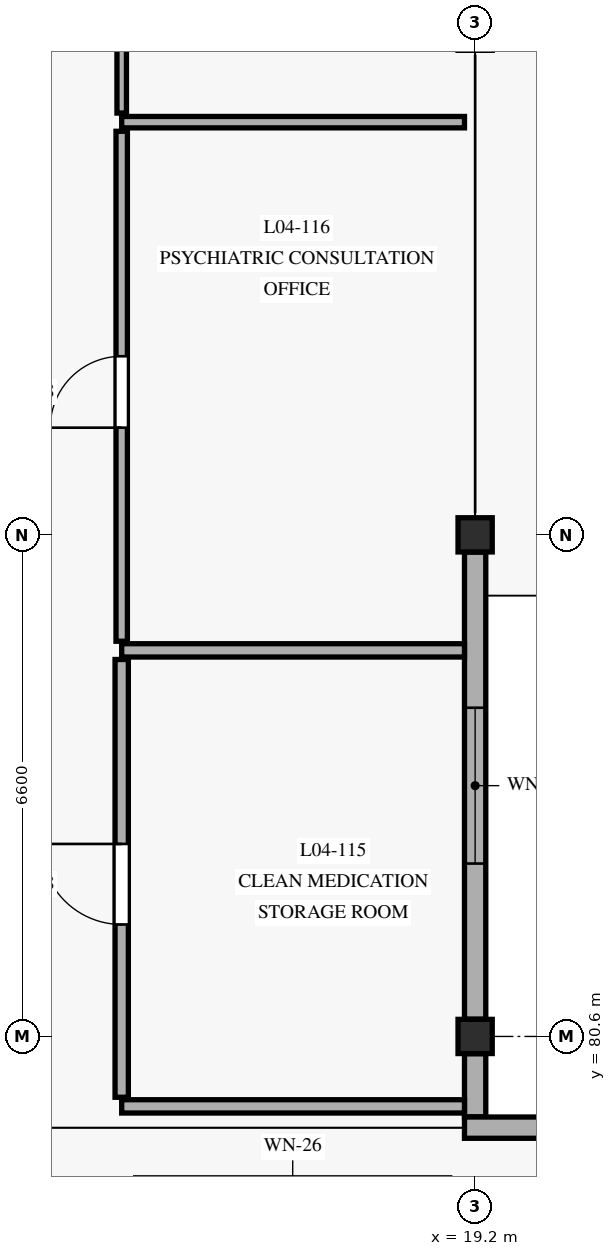
"""IFC4 building model, lengths in metres.
Left out: names, types, materials, properties, quantities, classifications, styles, units other than length and angle.
Written with IfcOpenShell. Run it as: python <this file> out.ifc"""

import sys

from ifc_helpers import new_model, si_unit, direction, frame, frame_2d, origin, origin_with_axes, origin_2d, place, context, subcontext, project, spatial, rectangle, extrude, element, fill, save


model = new_model("IFC4")
c1 = context("Model", 3, precision=1e-05, world=origin(), true_north=direction((0.0, 1.0)))
c2 = subcontext(c1, "Body", "Model", "MODEL_VIEW")
j1 = project(units=[si_unit("LENGTHUNIT", "METRE"), si_unit("PLANEANGLEUNIT", "RADIAN")], contexts=[c1])
p1 = place(None, origin())
s1 = spatial("IfcSite", under=j1, at=p1, CompositionType="ELEMENT")
p2 = place(p1, origin())
s2 = spatial("IfcBuilding", under=s1, at=p2, CompositionType="ELEMENT")
p3 = place(p2, frame((0.0, 0.0, 13.5)))
s3 = spatial("IfcBuildingStorey", under=s2, at=p3, CompositionType="ELEMENT", Elevation=13.5)
for number, where, z_axis, x_axis in (
    (1, (19.2, 80.6, 0.0), (0.0, 0.0, 1.0), (1.0, 0.0, 0.0)),
    (2, (19.2, 87.2, 0.0), (0.0, 0.0, 1.0), (1.0, 0.0, 0.0)),
):
    element("IfcColumn", number, at=place(p3, frame(where, z_axis=z_axis, x_axis=x_axis)), inside=s3, PredefinedType="COLUMN", context=c2, shape_type="SweptSolid", body=[
        extrude(rectangle(XDim=0.45, YDim=0.45, at=origin_2d()), origin(), (0.0, 0.0, 1.0), 4.05),
    ])
p4 = place(p3, frame((19.2, 79.542, 0.0), z_axis=(0.0, 0.0, 1.0), x_axis=(0.0, 1.0, 0.0)))
e3 = element("IfcWall", 3, at=p4, inside=s3, PredefinedType="SOLIDWALL", context=c2, shape_type="SweptSolid", body=[
    extrude(rectangle(XDim=0.831, YDim=0.28, at=frame_2d((0.416, 0.0))), origin(), (0.0, 0.0, 1.0), 3.42),
])
p5 = place(p3, frame((19.2, 80.827, 0.0), z_axis=(0.0, 0.0, 1.0), x_axis=(0.0, 1.0, 0.0)))
e4 = element("IfcWall", 4, at=p5, inside=s3, PredefinedType="SOLIDWALL", context=c2, shape_type="SweptSolid", body=[
    extrude(rectangle(XDim=6.146, YDim=0.28, at=frame_2d((3.073, 0.0))), origin(), (0.0, 0.0, 1.0), 3.42),
])
p6 = place(p5, frame((2.048, 0.0, 0.8)))
e5 = element("IfcOpeningElement", 5, at=p6, cuts=e4, PredefinedType="OPENING", context=c2, shape_type="SweptSolid", body=[
    extrude(rectangle(XDim=2.05, YDim=1.95, at=frame_2d((1.025, 0.975))), frame((0.0, 0.15, 0.0), z_axis=(0.0, -1.0, 0.0), x_axis=(1.0, 0.0, 0.0)), (0.0, 0.0, 1.0), 0.3),
])
p7 = place(p3, frame((22.34, 79.4, 0.0), z_axis=(0.0, 0.0, 1.0), x_axis=(-1.0, 0.0, 0.0)))
e6 = element("IfcWall", 6, at=p7, inside=s3, PredefinedType="SOLIDWALL", context=c2, shape_type="SweptSolid", body=[
    extrude(rectangle(XDim=3.28, YDim=0.28, at=frame_2d((1.64, 0.0))), origin(), (0.0, 0.0, 1.0), 3.75),
])
p8 = place(p7, frame((1.115, 0.0, 0.88)))
e7 = element("IfcOpeningElement", 7, at=p8, cuts=e6, PredefinedType="OPENING", context=c2, shape_type="SweptSolid", body=[
    extrude(rectangle(XDim=1.05, YDim=2.2, at=frame_2d((0.525, 1.1))), frame((0.0, 0.15, 0.0), z_axis=(0.0, -1.0, 0.0), x_axis=(1.0, 0.0, 0.0)), (0.0, 0.0, 1.0), 0.3),
])
p9 = place(p3, frame((14.55, 79.8, 0.0), z_axis=(0.0, 0.0, 1.0), x_axis=(0.0, 1.0, 0.0)))
e8 = element("IfcWall", 8, at=p9, inside=s3, PredefinedType="PARTITIONING", context=c2, shape_type="SweptSolid", body=[
    extrude(rectangle(XDim=5.76, YDim=0.175, at=frame_2d((2.88, 0.0))), origin(), (0.0, 0.0, 1.0), 3.345),
])
p10 = place(p9, frame((2.273, 0.0, 0.0)))
e9 = element("IfcOpeningElement", 9, at=p10, cuts=e8, PredefinedType="OPENING", context=c2, shape_type="SweptSolid", body=[
    extrude(rectangle(XDim=1.06, YDim=2.2, at=frame_2d((0.53, 1.1))), frame((0.0, 0.098, 0.0), z_axis=(0.0, -1.0, 0.0), x_axis=(1.0, 0.0, 0.0)), (0.0, 0.0, 1.0), 0.195),
])
for number, where, z_axis, x_axis in (
    (10, (14.55, 79.68, 0.0), (0.0, 0.0, 1.0), (1.0, 0.0, 0.0)),
    (11, (14.55, 85.68, 0.0), (0.0, 0.0, 1.0), (1.0, 0.0, 0.0)),
):
    element("IfcWall", number, at=place(p3, frame(where, z_axis=z_axis, x_axis=x_axis)), inside=s3, PredefinedType="PARTITIONING", context=c2, shape_type="SweptSolid", body=[
        extrude(rectangle(XDim=4.51, YDim=0.175, at=frame_2d((2.255, 0.0))), origin(), (0.0, 0.0, 1.0), 3.415),
    ])
p11 = place(p3, frame((14.55, 85.8, 0.0), z_axis=(0.0, 0.0, 1.0), x_axis=(0.0, 1.0, 0.0)))
e12 = element("IfcWall", 12, at=p11, inside=s3, PredefinedType="PARTITIONING", context=c2, shape_type="SweptSolid", body=[
    extrude(rectangle(XDim=6.71, YDim=0.15, at=frame_2d((3.355, 0.0))), origin(), (0.0, 0.0, 1.0), 3.345),
])
p12 = place(p11, frame((2.81, 0.0, 0.0)))
e13 = element("IfcOpeningElement", 13, at=p12, cuts=e12, PredefinedType="OPENING", context=c2, shape_type="SweptSolid", body=[
    extrude(rectangle(XDim=0.94, YDim=2.18, at=frame_2d((0.47, 1.09))), frame((0.0, 0.085, 0.0), z_axis=(0.0, -1.0, 0.0), x_axis=(1.0, 0.0, 0.0)), (0.0, 0.0, 1.0), 0.17),
])
p13 = place(p3, frame((14.55, 92.63, 0.0), z_axis=(0.0, 0.0, 1.0), x_axis=(1.0, 0.0, 0.0)))
e14 = element("IfcWall", 14, at=p13, inside=s3, PredefinedType="PARTITIONING", context=c2, shape_type="SweptSolid", body=[
    extrude(rectangle(XDim=4.51, YDim=0.15, at=frame_2d((2.255, 0.0))), origin(), (0.0, 0.0, 1.0), 3.415),
])
p14 = place(p3, frame((14.55, 92.75, 0.0), z_axis=(0.0, 0.0, 1.0), x_axis=(0.0, 1.0, 0.0)))
e15 = element("IfcWall", 15, at=p14, inside=s3, PredefinedType="PARTITIONING", context=c2, shape_type="SweptSolid", body=[
    extrude(rectangle(XDim=5.36, YDim=0.125, at=frame_2d((2.68, 0.0))), origin(), (0.0, 0.0, 1.0), 3.345),
])
p15 = place(p14, frame((2.23, 0.0, 0.0)))
e16 = element("IfcOpeningElement", 16, at=p15, cuts=e15, PredefinedType="OPENING", context=c2, shape_type="SweptSolid", body=[
    extrude(rectangle(XDim=0.9, YDim=2.12, at=frame_2d((0.45, 1.06))), frame((0.0, 0.073, 0.0), z_axis=(0.0, -1.0, 0.0), x_axis=(1.0, 0.0, 0.0)), (0.0, 0.0, 1.0), 0.145),
])
p16 = place(p6, origin_with_axes())
e17 = element("IfcWindow", 17, at=p16, inside=s3, PartitioningType="SINGLE_PANEL", PredefinedType="WINDOW", context=c2, shape_type="SweptSolid", body=[
    extrude(rectangle(XDim=2.05, YDim=1.95, at=frame_2d((1.025, 0.975))), frame((0.0, 0.03, 0.0), z_axis=(0.0, -1.0, 0.0), x_axis=(1.0, 0.0, 0.0)), (0.0, 0.0, 1.0), 0.06),
])
fill(e5, e17)
p17 = place(p10, frame((1.06, 0.0, 0.0), z_axis=(0.0, 0.0, 1.0), x_axis=(-1.0, 0.0, 0.0)))
e18 = element("IfcDoor", 18, at=p17, inside=s3, OperationType="SINGLE_SWING_LEFT", PredefinedType="DOOR", context=c2, shape_type="SweptSolid", body=[
    extrude(rectangle(XDim=1.06, YDim=2.2, at=frame_2d((0.53, 1.1))), frame((0.0, 0.025, 0.0), z_axis=(0.0, -1.0, 0.0), x_axis=(1.0, 0.0, 0.0)), (0.0, 0.0, 1.0), 0.05),
])
fill(e9, e18)
p18 = place(p12, frame((0.94, 0.0, 0.0), z_axis=(0.0, 0.0, 1.0), x_axis=(-1.0, 0.0, 0.0)))
e19 = element("IfcDoor", 19, at=p18, inside=s3, OperationType="SINGLE_SWING_RIGHT", PredefinedType="DOOR", context=c2, shape_type="SweptSolid", body=[
    extrude(rectangle(XDim=0.94, YDim=2.18, at=frame_2d((0.47, 1.09))), frame((0.0, 0.025, 0.0), z_axis=(0.0, -1.0, 0.0), x_axis=(1.0, 0.0, 0.0)), (0.0, 0.0, 1.0), 0.05),
])
fill(e13, e19)
save(model, sys.argv[1])
